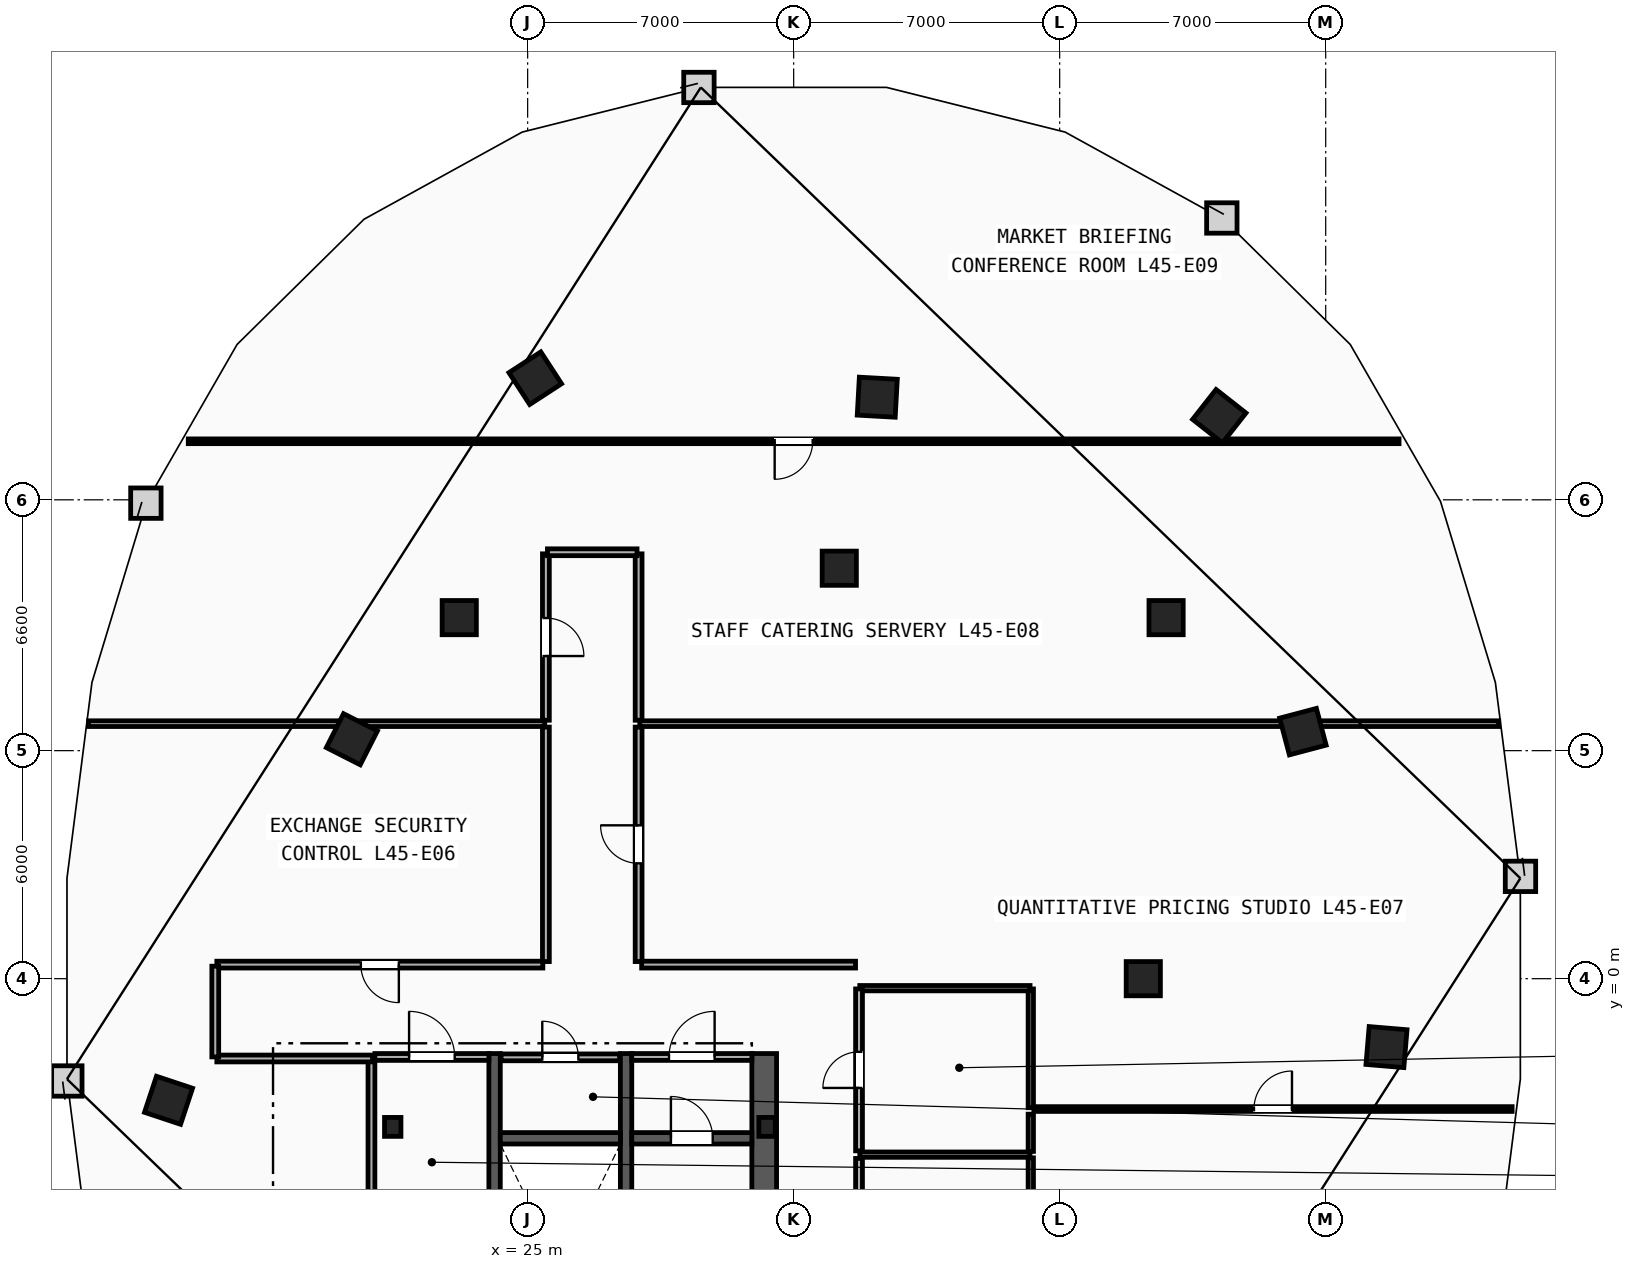
"""IFC4 building model, lengths in metres.
Left out: names, types, materials, properties, quantities, classifications, styles, units other than length and angle.
Written with IfcOpenShell. Run it as: python <this file> out.ifc"""

import sys

from ifc_helpers import new_model, si_unit, direction, frame, frame_2d, origin, origin_2d, place, context, subcontext, project, spatial, rectangle, i_section, extrude, element, fill, save


model = new_model("IFC4")
c1 = context("Model", 3, precision=1e-05, world=origin(), true_north=direction((0.0, 1.0)))
c2 = subcontext(c1, "Body", "Model", "MODEL_VIEW")
j1 = project(units=[si_unit("LENGTHUNIT", "METRE"), si_unit("PLANEANGLEUNIT", "RADIAN")], contexts=[c1])
p1 = place(None, origin())
s1 = spatial("IfcSite", under=j1, at=p1, CompositionType="ELEMENT")
p2 = place(p1, origin())
s2 = spatial("IfcBuilding", under=s1, at=p2, CompositionType="ELEMENT")
p3 = place(p2, frame((0.0, 0.0, 172.8)))
s3 = spatial("IfcBuildingStorey", under=s2, at=p3, CompositionType="ELEMENT", Elevation=172.8)
for number, where, z_axis, x_axis in (
    (1, (31.3, -3.9, 0.0), (0.0, 0.0, 1.0), (1.0, 0.0, 0.0)),
    (2, (21.45, -3.9, 0.0), (0.0, 0.0, 1.0), (1.0, 0.0, 0.0)),
):
    element("IfcColumn", number, at=place(p3, frame(where, z_axis=z_axis, x_axis=x_axis)), inside=s3, PredefinedType="COLUMN", context=c2, shape_type="SweptSolid", body=[
        extrude(i_section(OverallWidth=0.432, OverallDepth=0.498, WebThickness=0.056, FlangeThickness=0.089, FilletRadius=0.018, at=origin_2d()), origin(), (0.0, 0.0, 1.0), 3.6),
    ])
for number, where, z_axis, x_axis in (
    (3, (41.2, 0.0, 0.0), (0.0, 0.0, 1.0), (1.0, 0.0, 0.0)),
    (4, (41.8, 9.5, 0.0), (0.0, 0.0, 1.0), (1.0, 0.0, 0.0)),
    (5, (33.2, 10.8, 0.0), (0.0, 0.0, 1.0), (1.0, 0.0, 0.0)),
    (6, (23.2, 9.5, 0.0), (0.0, 0.0, 1.0), (1.0, 0.0, 0.0)),
):
    element("IfcColumn", number, at=place(p3, frame(where, z_axis=z_axis, x_axis=x_axis)), inside=s3, PredefinedType="COLUMN", context=c2, shape_type="SweptSolid", body=[
        extrude(rectangle(XDim=0.9, YDim=0.9, at=origin_2d()), origin(), (0.0, 0.0, 1.0), 3.6),
    ])
for number, where, z_axis, x_axis in (
    (7, (15.55, -3.2, 0.0), (0.0, 0.0, 1.0), (-0.315, -0.949, 0.0)),
    (8, (47.6, -1.8, 0.0), (0.0, 0.0, 1.0), (0.084, 0.997, 0.0)),
    (9, (45.4, 6.5, 0.0), (0.0, 0.0, 1.0), (-0.256, 0.967, 0.0)),
    (10, (43.2, 14.8, 0.0), (0.0, 0.0, 1.0), (-0.786, 0.618, 0.0)),
    (11, (34.2, 15.3, 0.0), (0.0, 0.0, 1.0), (-0.998, 0.055, 0.0)),
    (12, (25.2, 15.8, 0.0), (0.0, 0.0, 1.0), (-0.838, -0.546, 0.0)),
    (13, (20.375, 6.3, 0.0), (0.0, 0.0, 1.0), (-0.453, -0.892, 0.0)),
):
    element("IfcColumn", number, at=place(p3, frame(where, z_axis=z_axis, x_axis=x_axis)), inside=s3, PredefinedType="COLUMN", context=c2, shape_type="SweptSolid", body=[
        extrude(rectangle(XDim=1.0, YDim=1.0, at=origin_2d()), origin(), (0.0, 0.0, 1.0), 3.6),
    ])
p4 = place(p3, frame((31.225, -15.3, 0.0), z_axis=(0.0, 0.0, 1.0), x_axis=(0.0, 1.0, 0.0)))
e14 = element("IfcWall", 14, at=p4, inside=s3, PredefinedType="SHEAR", context=c2, shape_type="SweptSolid", body=[
    extrude(rectangle(XDim=13.33, YDim=0.65, at=frame_2d((6.665, 0.0))), origin(), (0.0, 0.0, 1.0), 3.36),
])
for number, where, z_axis, x_axis in (
    (15, (27.59, -12.65, 0.0), (0.0, 0.0, 1.0), (0.0, 1.0, 0.0)),
    (16, (24.13, -12.65, 0.0), (0.0, 0.0, 1.0), (0.0, 1.0, 0.0)),
):
    element("IfcWall", number, at=place(p3, frame(where, z_axis=z_axis, x_axis=x_axis)), inside=s3, PredefinedType="SHEAR", context=c2, shape_type="SweptSolid", body=[
        extrude(rectangle(XDim=10.68, YDim=0.3, at=frame_2d((5.34, 0.0))), origin(), (0.0, 0.0, 1.0), 3.36),
    ])
p5 = place(p3, frame((27.74, -4.2, 0.0), z_axis=(0.0, 0.0, 1.0), x_axis=(1.0, 0.0, 0.0)))
e17 = element("IfcWall", 17, at=p5, inside=s3, PredefinedType="SHEAR", context=c2, shape_type="SweptSolid", body=[
    extrude(rectangle(XDim=3.16, YDim=0.3, at=frame_2d((1.58, 0.0))), origin(), (0.0, 0.0, 1.0), 3.36),
])
p6 = place(p5, frame((1.03, 0.0, 0.0)))
e18 = element("IfcOpeningElement", 18, at=p6, cuts=e17, PredefinedType="OPENING", context=c2, shape_type="SweptSolid", body=[
    extrude(rectangle(XDim=1.1, YDim=2.15, at=frame_2d((0.55, 1.075))), frame((0.0, 0.16, 0.0), z_axis=(0.0, -1.0, 0.0), x_axis=(1.0, 0.0, 0.0)), (0.0, 0.0, 1.0), 0.32),
])
p7 = place(p3, frame((24.28, -4.2, 0.0), z_axis=(0.0, 0.0, 1.0), x_axis=(1.0, 0.0, 0.0)))
e19 = element("IfcWall", 19, at=p7, inside=s3, PredefinedType="SHEAR", context=c2, shape_type="SweptSolid", body=[
    extrude(rectangle(XDim=3.16, YDim=0.3, at=frame_2d((1.58, 0.0))), origin(), (0.0, 0.0, 1.0), 3.36),
])
p8 = place(p3, frame((20.89, -7.45, 0.0), z_axis=(0.0, 0.0, 1.0), x_axis=(0.0, 1.0, 0.0)))
e20 = element("IfcWall", 20, at=p8, inside=s3, PredefinedType="PARTITIONING", context=c2, shape_type="SweptSolid", body=[
    extrude(rectangle(XDim=5.3, YDim=0.18, at=frame_2d((2.65, 0.0))), origin(), (0.0, 0.0, 1.0), 3.36),
])
p9 = place(p3, frame((20.98, -2.06, 0.0), z_axis=(0.0, 0.0, 1.0), x_axis=(1.0, 0.0, 0.0)))
e21 = element("IfcWall", 21, at=p9, inside=s3, PredefinedType="PARTITIONING", context=c2, shape_type="SweptSolid", body=[
    extrude(rectangle(XDim=3.0, YDim=0.18, at=frame_2d((1.5, 0.0))), origin(), (0.0, 0.0, 1.0), 3.36),
])
p10 = place(p9, frame((0.9, 0.0, 0.0)))
e22 = element("IfcOpeningElement", 22, at=p10, cuts=e21, PredefinedType="OPENING", context=c2, shape_type="SweptSolid", body=[
    extrude(rectangle(XDim=1.2, YDim=2.15, at=frame_2d((0.6, 1.075))), frame((0.0, 0.1, 0.0), z_axis=(0.0, -1.0, 0.0), x_axis=(1.0, 0.0, 0.0)), (0.0, 0.0, 1.0), 0.2),
])
p11 = place(p3, frame((27.74, -2.06, 0.0), z_axis=(0.0, 0.0, 1.0), x_axis=(1.0, 0.0, 0.0)))
e23 = element("IfcWall", 23, at=p11, inside=s3, PredefinedType="PARTITIONING", context=c2, shape_type="SweptSolid", body=[
    extrude(rectangle(XDim=3.16, YDim=0.18, at=frame_2d((1.58, 0.0))), origin(), (0.0, 0.0, 1.0), 3.36),
])
p12 = place(p11, frame((0.98, 0.0, 0.0)))
e24 = element("IfcOpeningElement", 24, at=p12, cuts=e23, PredefinedType="OPENING", context=c2, shape_type="SweptSolid", body=[
    extrude(rectangle(XDim=1.2, YDim=2.15, at=frame_2d((0.6, 1.075))), frame((0.0, 0.1, 0.0), z_axis=(0.0, -1.0, 0.0), x_axis=(1.0, 0.0, 0.0)), (0.0, 0.0, 1.0), 0.2),
])
p13 = place(p3, frame((24.3, -2.07, 0.0), z_axis=(0.0, 0.0, 1.0), x_axis=(1.0, 0.0, 0.0)))
e25 = element("IfcWall", 25, at=p13, inside=s3, PredefinedType="PARTITIONING", context=c2, shape_type="SweptSolid", body=[
    extrude(rectangle(XDim=3.12, YDim=0.18, at=frame_2d((1.56, 0.0))), origin(), (0.0, 0.0, 1.0), 3.36),
])
p14 = place(p13, frame((1.085, 0.0, 0.0)))
e26 = element("IfcOpeningElement", 26, at=p14, cuts=e25, PredefinedType="OPENING", context=c2, shape_type="SweptSolid", body=[
    extrude(rectangle(XDim=0.95, YDim=2.1, at=frame_2d((0.475, 1.05))), frame((0.0, 0.1, 0.0), z_axis=(0.0, -1.0, 0.0), x_axis=(1.0, 0.0, 0.0)), (0.0, 0.0, 1.0), 0.2),
])
p15 = place(p3, frame((38.24, -8.395, 0.0), z_axis=(0.0, 0.0, 1.0), x_axis=(0.0, 1.0, 0.0)))
e27 = element("IfcWall", 27, at=p15, inside=s3, PredefinedType="PARTITIONING", context=c2, shape_type="SweptSolid", body=[
    extrude(rectangle(XDim=3.68, YDim=0.14, at=frame_2d((1.84, 0.0))), origin(), (0.0, 0.0, 1.0), 3.36),
])
p16 = place(p3, frame((38.24, -4.545, 0.0), z_axis=(0.0, 0.0, 1.0), x_axis=(0.0, 1.0, 0.0)))
e28 = element("IfcWall", 28, at=p16, inside=s3, PredefinedType="PARTITIONING", context=c2, shape_type="SweptSolid", body=[
    extrude(rectangle(XDim=0.98, YDim=0.14, at=frame_2d((0.49, 0.0))), origin(), (0.0, 0.0, 1.0), 3.36),
])
p17 = place(p3, frame((38.24, -3.395, 0.0), z_axis=(0.0, 0.0, 1.0), x_axis=(0.0, 1.0, 0.0)))
e29 = element("IfcWall", 29, at=p17, inside=s3, PredefinedType="PARTITIONING", context=c2, shape_type="SweptSolid", body=[
    extrude(rectangle(XDim=3.125, YDim=0.14, at=frame_2d((1.562, 0.0))), origin(), (0.0, 0.0, 1.0), 3.36),
])
for number, where, z_axis, x_axis in (
    (30, (33.74, -0.25, 0.0), (0.0, 0.0, 1.0), (1.0, 0.0, 0.0)),
    (31, (33.74, -4.63, 0.0), (0.0, 0.0, 1.0), (1.0, 0.0, 0.0)),
):
    element("IfcWall", number, at=place(p3, frame(where, z_axis=z_axis, x_axis=x_axis)), inside=s3, PredefinedType="PARTITIONING", context=c2, shape_type="SweptSolid", body=[
        extrude(rectangle(XDim=4.48, YDim=0.14, at=frame_2d((2.24, 0.0))), origin(), (0.0, 0.0, 1.0), 3.36),
    ])
p18 = place(p3, frame((33.72, -4.53, 0.0), z_axis=(0.0, 0.0, 1.0), x_axis=(0.0, 1.0, 0.0)))
e32 = element("IfcWall", 32, at=p18, inside=s3, PredefinedType="PARTITIONING", context=c2, shape_type="SweptSolid", body=[
    extrude(rectangle(XDim=4.26, YDim=0.18, at=frame_2d((2.13, 0.0))), origin(), (0.0, 0.0, 1.0), 3.36),
])
p19 = place(p18, frame((1.655, 0.0, 0.0)))
e33 = element("IfcOpeningElement", 33, at=p19, cuts=e32, PredefinedType="OPENING", context=c2, shape_type="SweptSolid", body=[
    extrude(rectangle(XDim=0.95, YDim=2.1, at=frame_2d((0.475, 1.05))), frame((0.0, 0.1, 0.0), z_axis=(0.0, -1.0, 0.0), x_axis=(1.0, 0.0, 0.0)), (0.0, 0.0, 1.0), 0.2),
])
p20 = place(p3, frame((33.72, -8.89, 0.0), z_axis=(0.0, 0.0, 1.0), x_axis=(0.0, 1.0, 0.0)))
e34 = element("IfcWall", 34, at=p20, inside=s3, PredefinedType="PARTITIONING", context=c2, shape_type="SweptSolid", body=[
    extrude(rectangle(XDim=4.16, YDim=0.18, at=frame_2d((2.08, 0.0))), origin(), (0.0, 0.0, 1.0), 3.36),
])
p21 = place(p20, frame((1.58, 0.0, 0.0)))
e35 = element("IfcOpeningElement", 35, at=p21, cuts=e34, PredefinedType="OPENING", context=c2, shape_type="SweptSolid", body=[
    extrude(rectangle(XDim=1.0, YDim=2.15, at=frame_2d((0.5, 1.075))), frame((0.0, 0.1, 0.0), z_axis=(0.0, -1.0, 0.0), x_axis=(1.0, 0.0, 0.0)), (0.0, 0.0, 1.0), 0.2),
])
p22 = place(p3, frame((13.447, 6.71, 0.0), z_axis=(0.0, 0.0, 1.0), x_axis=(1.0, 0.0, 0.0)))
e36 = element("IfcWall", 36, at=p22, inside=s3, PredefinedType="PARTITIONING", context=c2, shape_type="SweptSolid", body=[
    extrude(rectangle(XDim=12.003, YDim=0.15, at=frame_2d((6.001, 0.0))), origin(), (0.0, 0.0, 1.0), 3.36),
])
p23 = place(p3, frame((27.95, 6.71, 0.0), z_axis=(0.0, 0.0, 1.0), x_axis=(1.0, 0.0, 0.0)))
e37 = element("IfcWall", 37, at=p23, inside=s3, PredefinedType="PARTITIONING", context=c2, shape_type="SweptSolid", body=[
    extrude(rectangle(XDim=22.603, YDim=0.15, at=frame_2d((11.302, 0.0))), origin(), (0.0, 0.0, 1.0), 3.36),
])
p24 = place(p3, frame((25.4, 0.37, 0.0), z_axis=(0.0, 0.0, 1.0), x_axis=(-1.0, 0.0, 0.0)))
e38 = element("IfcWall", 38, at=p24, inside=s3, PredefinedType="PARTITIONING", context=c2, shape_type="SweptSolid", body=[
    extrude(rectangle(XDim=8.578, YDim=0.18, at=frame_2d((4.289, 0.0))), origin(), (0.0, 0.0, 1.0), 3.36),
])
p25 = place(p24, frame((3.789, 0.0, 0.0)))
e39 = element("IfcOpeningElement", 39, at=p25, cuts=e38, PredefinedType="OPENING", context=c2, shape_type="SweptSolid", body=[
    extrude(rectangle(XDim=1.0, YDim=2.15, at=frame_2d((0.5, 1.075))), frame((0.0, 0.1, 0.0), z_axis=(0.0, -1.0, 0.0), x_axis=(1.0, 0.0, 0.0)), (0.0, 0.0, 1.0), 0.2),
])
p26 = place(p3, frame((25.48, 6.62, 0.0), z_axis=(0.0, 0.0, 1.0), x_axis=(0.0, -1.0, 0.0)))
e40 = element("IfcWall", 40, at=p26, inside=s3, PredefinedType="PARTITIONING", context=c2, shape_type="SweptSolid", body=[
    extrude(rectangle(XDim=6.17, YDim=0.18, at=frame_2d((3.085, 0.0))), origin(), (0.0, 0.0, 1.0), 3.36),
])
p27 = place(p3, frame((16.822, -2.1, 0.0), z_axis=(0.0, 0.0, 1.0), x_axis=(1.0, 0.0, 0.0)))
e41 = element("IfcWall", 41, at=p27, inside=s3, PredefinedType="PARTITIONING", context=c2, shape_type="SweptSolid", body=[
    extrude(rectangle(XDim=4.098, YDim=0.18, at=frame_2d((2.049, 0.0))), origin(), (0.0, 0.0, 1.0), 3.36),
])
p28 = place(p3, frame((16.78, 0.329, 0.0), z_axis=(0.0, 0.0, 1.0), x_axis=(0.0, -1.0, 0.0)))
e42 = element("IfcWall", 42, at=p28, inside=s3, PredefinedType="PARTITIONING", context=c2, shape_type="SweptSolid", body=[
    extrude(rectangle(XDim=2.387, YDim=0.18, at=frame_2d((1.194, 0.0))), origin(), (0.0, 0.0, 1.0), 3.36),
])
p29 = place(p3, frame((27.92, 0.45, 0.0), z_axis=(0.0, 0.0, 1.0), x_axis=(0.0, 1.0, 0.0)))
e43 = element("IfcWall", 43, at=p29, inside=s3, PredefinedType="PARTITIONING", context=c2, shape_type="SweptSolid", body=[
    extrude(rectangle(XDim=6.17, YDim=0.18, at=frame_2d((3.085, 0.0))), origin(), (0.0, 0.0, 1.0), 3.36),
])
p30 = place(p29, frame((2.585, 0.0, 0.0)))
e44 = element("IfcOpeningElement", 44, at=p30, cuts=e43, PredefinedType="OPENING", context=c2, shape_type="SweptSolid", body=[
    extrude(rectangle(XDim=1.0, YDim=2.15, at=frame_2d((0.5, 1.075))), frame((0.0, 0.1, 0.0), z_axis=(0.0, -1.0, 0.0), x_axis=(1.0, 0.0, 0.0)), (0.0, 0.0, 1.0), 0.2),
])
p31 = place(p3, frame((33.628, 0.37, 0.0), z_axis=(0.0, 0.0, 1.0), x_axis=(-1.0, 0.0, 0.0)))
e45 = element("IfcWall", 45, at=p31, inside=s3, PredefinedType="PARTITIONING", context=c2, shape_type="SweptSolid", body=[
    extrude(rectangle(XDim=5.628, YDim=0.18, at=frame_2d((2.814, 0.0))), origin(), (0.0, 0.0, 1.0), 3.36),
])
p32 = place(p3, frame((25.48, 11.178, 0.0), z_axis=(0.0, 0.0, 1.0), x_axis=(0.0, -1.0, 0.0)))
e46 = element("IfcWall", 46, at=p32, inside=s3, PredefinedType="PARTITIONING", context=c2, shape_type="SweptSolid", body=[
    extrude(rectangle(XDim=4.378, YDim=0.18, at=frame_2d((2.189, 0.0))), origin(), (0.0, 0.0, 1.0), 3.36),
])
p33 = place(p32, frame((1.689, 0.0, 0.0)))
e47 = element("IfcOpeningElement", 47, at=p33, cuts=e46, PredefinedType="OPENING", context=c2, shape_type="SweptSolid", body=[
    extrude(rectangle(XDim=1.0, YDim=2.15, at=frame_2d((0.5, 1.075))), frame((0.0, 0.1, 0.0), z_axis=(0.0, -1.0, 0.0), x_axis=(1.0, 0.0, 0.0)), (0.0, 0.0, 1.0), 0.2),
])
p34 = place(p3, frame((27.92, 6.8, 0.0), z_axis=(0.0, 0.0, 1.0), x_axis=(0.0, 1.0, 0.0)))
e48 = element("IfcWall", 48, at=p34, inside=s3, PredefinedType="PARTITIONING", context=c2, shape_type="SweptSolid", body=[
    extrude(rectangle(XDim=4.378, YDim=0.18, at=frame_2d((2.189, 0.0))), origin(), (0.0, 0.0, 1.0), 3.36),
])
p35 = place(p3, frame((27.878, 11.22, 0.0), z_axis=(0.0, 0.0, 1.0), x_axis=(-1.0, 0.0, 0.0)))
e49 = element("IfcWall", 49, at=p35, inside=s3, PredefinedType="PARTITIONING", context=c2, shape_type="SweptSolid", body=[
    extrude(rectangle(XDim=2.357, YDim=0.18, at=frame_2d((1.178, 0.0))), origin(), (0.0, 0.0, 1.0), 3.36),
])
p36 = place(p3, frame((38.32, -3.43, 0.0), z_axis=(0.0, 0.0, 1.0), x_axis=(1.0, 0.0, 0.0)))
e50 = element("IfcWall", 50, at=p36, inside=s3, PredefinedType="PARTITIONING", context=c2, shape_type="SweptSolid", body=[
    extrude(rectangle(XDim=12.585, YDim=0.125, at=frame_2d((6.293, 0.0))), origin(), (0.0, 0.0, 1.0), 3.36),
])
p37 = place(p36, frame((5.793, 0.0, 0.0)))
e51 = element("IfcOpeningElement", 51, at=p37, cuts=e50, PredefinedType="OPENING", context=c2, shape_type="SweptSolid", body=[
    extrude(rectangle(XDim=1.0, YDim=2.15, at=frame_2d((0.5, 1.075))), frame((0.0, 0.073, 0.0), z_axis=(0.0, -1.0, 0.0), x_axis=(1.0, 0.0, 0.0)), (0.0, 0.0, 1.0), 0.145),
])
p38 = place(p3, frame((47.93, 14.14, 0.0), z_axis=(0.0, 0.0, 1.0), x_axis=(-1.0, 0.0, 0.0)))
e52 = element("IfcWall", 52, at=p38, inside=s3, PredefinedType="PARTITIONING", context=c2, shape_type="SweptSolid", body=[
    extrude(rectangle(XDim=31.86, YDim=0.125, at=frame_2d((15.93, 0.0))), origin(), (0.0, 0.0, 1.0), 3.36),
])
p39 = place(p38, frame((15.43, 0.0, 0.0)))
e53 = element("IfcOpeningElement", 53, at=p39, cuts=e52, PredefinedType="OPENING", context=c2, shape_type="SweptSolid", body=[
    extrude(rectangle(XDim=1.0, YDim=2.15, at=frame_2d((0.5, 1.075))), frame((0.0, 0.073, 0.0), z_axis=(0.0, -1.0, 0.0), x_axis=(1.0, 0.0, 0.0)), (0.0, 0.0, 1.0), 0.145),
])
p40 = place(p6, origin())
e54 = element("IfcDoor", 54, at=p40, inside=s3, OperationType="SINGLE_SWING_LEFT", PredefinedType="DOOR", context=c2, shape_type="SweptSolid", body=[
    extrude(rectangle(XDim=1.1, YDim=2.15, at=frame_2d((0.55, 1.075))), frame((0.0, 0.025, 0.0), z_axis=(0.0, -1.0, 0.0), x_axis=(1.0, 0.0, 0.0)), (0.0, 0.0, 1.0), 0.05),
])
fill(e18, e54)
p41 = place(p10, origin())
e55 = element("IfcDoor", 55, at=p41, inside=s3, OperationType="SINGLE_SWING_LEFT", PredefinedType="DOOR", context=c2, shape_type="SweptSolid", body=[
    extrude(rectangle(XDim=1.2, YDim=2.15, at=frame_2d((0.6, 1.075))), frame((0.0, 0.025, 0.0), z_axis=(0.0, -1.0, 0.0), x_axis=(1.0, 0.0, 0.0)), (0.0, 0.0, 1.0), 0.05),
])
fill(e22, e55)
p42 = place(p12, origin())
e56 = element("IfcDoor", 56, at=p42, inside=s3, OperationType="SINGLE_SWING_RIGHT", PredefinedType="DOOR", context=c2, shape_type="SweptSolid", body=[
    extrude(rectangle(XDim=1.2, YDim=2.15, at=frame_2d((0.6, 1.075))), frame((0.0, 0.025, 0.0), z_axis=(0.0, -1.0, 0.0), x_axis=(1.0, 0.0, 0.0)), (0.0, 0.0, 1.0), 0.05),
])
fill(e24, e56)
p43 = place(p39, origin())
e57 = element("IfcDoor", 57, at=p43, inside=s3, OperationType="SINGLE_SWING_RIGHT", PredefinedType="DOOR", context=c2, shape_type="SweptSolid", body=[
    extrude(rectangle(XDim=1.0, YDim=2.15, at=frame_2d((0.5, 1.075))), frame((0.0, 0.025, 0.0), z_axis=(0.0, -1.0, 0.0), x_axis=(1.0, 0.0, 0.0)), (0.0, 0.0, 1.0), 0.05),
])
fill(e53, e57)
p44 = place(p37, origin())
e58 = element("IfcDoor", 58, at=p44, inside=s3, OperationType="SINGLE_SWING_RIGHT", PredefinedType="DOOR", context=c2, shape_type="SweptSolid", body=[
    extrude(rectangle(XDim=1.0, YDim=2.15, at=frame_2d((0.5, 1.075))), frame((0.0, 0.025, 0.0), z_axis=(0.0, -1.0, 0.0), x_axis=(1.0, 0.0, 0.0)), (0.0, 0.0, 1.0), 0.05),
])
fill(e51, e58)
p45 = place(p25, origin())
e59 = element("IfcDoor", 59, at=p45, inside=s3, OperationType="SINGLE_SWING_LEFT", PredefinedType="DOOR", context=c2, shape_type="SweptSolid", body=[
    extrude(rectangle(XDim=1.0, YDim=2.15, at=frame_2d((0.5, 1.075))), frame((0.0, 0.025, 0.0), z_axis=(0.0, -1.0, 0.0), x_axis=(1.0, 0.0, 0.0)), (0.0, 0.0, 1.0), 0.05),
])
fill(e39, e59)
p46 = place(p30, origin())
e60 = element("IfcDoor", 60, at=p46, inside=s3, OperationType="SINGLE_SWING_RIGHT", PredefinedType="DOOR", context=c2, shape_type="SweptSolid", body=[
    extrude(rectangle(XDim=1.0, YDim=2.15, at=frame_2d((0.5, 1.075))), frame((0.0, 0.025, 0.0), z_axis=(0.0, -1.0, 0.0), x_axis=(1.0, 0.0, 0.0)), (0.0, 0.0, 1.0), 0.05),
])
fill(e44, e60)
p47 = place(p33, origin())
e61 = element("IfcDoor", 61, at=p47, inside=s3, OperationType="SINGLE_SWING_RIGHT", PredefinedType="DOOR", context=c2, shape_type="SweptSolid", body=[
    extrude(rectangle(XDim=1.0, YDim=2.15, at=frame_2d((0.5, 1.075))), frame((0.0, 0.025, 0.0), z_axis=(0.0, -1.0, 0.0), x_axis=(1.0, 0.0, 0.0)), (0.0, 0.0, 1.0), 0.05),
])
fill(e47, e61)
p48 = place(p19, origin())
e62 = element("IfcDoor", 62, at=p48, inside=s3, OperationType="SINGLE_SWING_LEFT", PredefinedType="DOOR", context=c2, shape_type="SweptSolid", body=[
    extrude(rectangle(XDim=0.95, YDim=2.1, at=frame_2d((0.475, 1.05))), frame((0.0, 0.025, 0.0), z_axis=(0.0, -1.0, 0.0), x_axis=(1.0, 0.0, 0.0)), (0.0, 0.0, 1.0), 0.05),
])
fill(e33, e62)
p49 = place(p14, origin())
e63 = element("IfcDoor", 63, at=p49, inside=s3, OperationType="SINGLE_SWING_LEFT", PredefinedType="DOOR", context=c2, shape_type="SweptSolid", body=[
    extrude(rectangle(XDim=0.95, YDim=2.1, at=frame_2d((0.475, 1.05))), frame((0.0, 0.025, 0.0), z_axis=(0.0, -1.0, 0.0), x_axis=(1.0, 0.0, 0.0)), (0.0, 0.0, 1.0), 0.05),
])
fill(e26, e63)
save(model, sys.argv[1])
